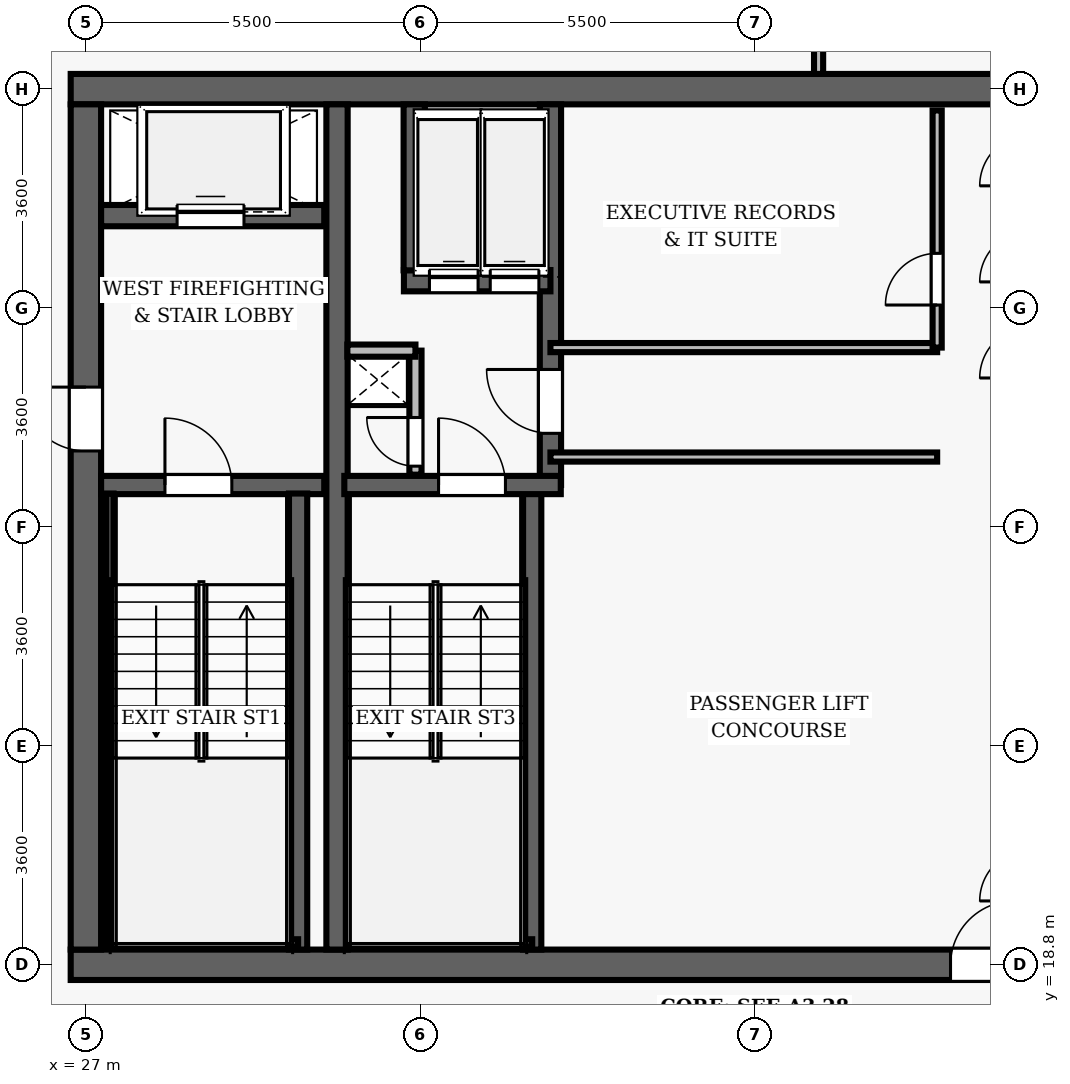
"""IFC4 building model, lengths in metres.
Left out: names, types, materials, properties, quantities, classifications, styles, units other than length and angle.
Written with IfcOpenShell. Run it as: python <this file> out.ifc"""

import sys

from ifc_helpers import new_model, si_unit, direction, frame, frame_2d, origin, place, context, subcontext, project, spatial, rectangle, extrude, element, fill, save


model = new_model("IFC4")
c1 = context("Model", 3, precision=1e-05, world=origin(), true_north=direction((0.0, 1.0)))
c2 = subcontext(c1, "Body", "Model", "MODEL_VIEW")
j1 = project(units=[si_unit("LENGTHUNIT", "METRE"), si_unit("PLANEANGLEUNIT", "RADIAN")], contexts=[c1])
p1 = place(None, origin())
s1 = spatial("IfcSite", under=j1, at=p1, CompositionType="ELEMENT")
p2 = place(p1, origin())
s2 = spatial("IfcBuilding", under=s1, at=p2, CompositionType="ELEMENT")
p3 = place(p2, frame((0.0, 0.0, 257.45)))
s3 = spatial("IfcBuildingStorey", under=s2, at=p3, CompositionType="ELEMENT", Elevation=257.45)
p4 = place(p3, frame((26.75, 18.8, 0.0), z_axis=(0.0, 0.0, 1.0), x_axis=(1.0, 0.0, 0.0)))
e1 = element("IfcWall", 1, at=p4, inside=s3, PredefinedType="SHEAR", context=c2, shape_type="SweptSolid", body=[
    extrude(rectangle(XDim=22.5, YDim=0.5, at=frame_2d((11.25, 0.0))), origin(), (0.0, 0.0, 1.0), 3.85),
])
p5 = place(p4, frame((14.47, 0.0, 0.0)))
e2 = element("IfcOpeningElement", 2, at=p5, cuts=e1, PredefinedType="OPENING", context=c2, shape_type="SweptSolid", body=[
    extrude(rectangle(XDim=1.05, YDim=2.15, at=frame_2d((0.525, 1.075))), frame((0.0, 0.26, 0.0), z_axis=(0.0, -1.0, 0.0), x_axis=(1.0, 0.0, 0.0)), (0.0, 0.0, 1.0), 0.52),
])
p6 = place(p3, frame((26.75, 33.2, 0.0), z_axis=(0.0, 0.0, 1.0), x_axis=(1.0, 0.0, 0.0)))
e3 = element("IfcWall", 3, at=p6, inside=s3, PredefinedType="SHEAR", context=c2, shape_type="SweptSolid", body=[
    extrude(rectangle(XDim=22.5, YDim=0.5, at=frame_2d((11.25, 0.0))), origin(), (0.0, 0.0, 1.0), 3.85),
])
p7 = place(p3, frame((27.0, 19.05, 0.0), z_axis=(0.0, 0.0, 1.0), x_axis=(0.0, 1.0, 0.0)))
e4 = element("IfcWall", 4, at=p7, inside=s3, PredefinedType="SHEAR", context=c2, shape_type="SweptSolid", body=[
    extrude(rectangle(XDim=13.9, YDim=0.5, at=frame_2d((6.95, 0.0))), origin(), (0.0, 0.0, 1.0), 3.85),
])
p8 = place(p7, frame((8.2, 0.0, 0.0)))
e5 = element("IfcOpeningElement", 5, at=p8, cuts=e4, PredefinedType="OPENING", context=c2, shape_type="SweptSolid", body=[
    extrude(rectangle(XDim=1.05, YDim=2.15, at=frame_2d((0.525, 1.075))), frame((0.0, 0.26, 0.0), z_axis=(0.0, -1.0, 0.0), x_axis=(1.0, 0.0, 0.0)), (0.0, 0.0, 1.0), 0.52),
])
p9 = place(p3, frame((31.13, 19.05, 0.0), z_axis=(0.0, 0.0, 1.0), x_axis=(0.0, 1.0, 0.0)))
e6 = element("IfcWall", 6, at=p9, inside=s3, PredefinedType="SHEAR", context=c2, shape_type="SweptSolid", body=[
    extrude(rectangle(XDim=13.9, YDim=0.35, at=frame_2d((6.95, 0.0))), origin(), (0.0, 0.0, 1.0), 3.85),
])
p10 = place(p3, frame((27.25, 26.69, 0.0), z_axis=(0.0, 0.0, 1.0), x_axis=(1.0, 0.0, 0.0)))
e7 = element("IfcWall", 7, at=p10, inside=s3, PredefinedType="SHEAR", context=c2, shape_type="SweptSolid", body=[
    extrude(rectangle(XDim=3.67, YDim=0.3, at=frame_2d((1.835, 0.0))), origin(), (0.0, 0.0, 1.0), 3.85),
])
p11 = place(p10, frame((1.05, 0.0, 0.0)))
e8 = element("IfcOpeningElement", 8, at=p11, cuts=e7, PredefinedType="OPENING", context=c2, shape_type="SweptSolid", body=[
    extrude(rectangle(XDim=1.1, YDim=2.15, at=frame_2d((0.55, 1.075))), frame((0.0, 0.16, 0.0), z_axis=(0.0, -1.0, 0.0), x_axis=(1.0, 0.0, 0.0)), (0.0, 0.0, 1.0), 0.32),
])
p12 = place(p3, frame((30.49, 19.05, 0.0), z_axis=(0.0, 0.0, 1.0), x_axis=(0.0, 1.0, 0.0)))
e9 = element("IfcWall", 9, at=p12, inside=s3, PredefinedType="SHEAR", context=c2, shape_type="SweptSolid", body=[
    extrude(rectangle(XDim=7.5, YDim=0.3, at=frame_2d((3.75, 0.0))), origin(), (0.0, 0.0, 1.0), 3.85),
])
p13 = place(p3, frame((27.395, 19.1, 0.0), z_axis=(0.0, 0.0, 1.0), x_axis=(0.0, 1.0, 0.0)))
e10 = element("IfcWall", 10, at=p13, inside=s3, PredefinedType="SHEAR", context=c2, shape_type="SweptSolid", body=[
    extrude(rectangle(XDim=7.45, YDim=0.12, at=frame_2d((3.725, 0.0))), origin(), (0.0, 0.0, 1.0), 3.85),
])
p14 = place(p3, frame((27.395, 19.16, 0.0), z_axis=(0.0, 0.0, 1.0), x_axis=(1.0, 0.0, 0.0)))
e11 = element("IfcWall", 11, at=p14, inside=s3, PredefinedType="SHEAR", context=c2, shape_type="SweptSolid", body=[
    extrude(rectangle(XDim=3.095, YDim=0.12, at=frame_2d((1.547, 0.0))), origin(), (0.0, 0.0, 1.0), 3.85),
])
p15 = place(p3, frame((27.25, 31.12, 0.0), z_axis=(0.0, 0.0, 1.0), x_axis=(1.0, 0.0, 0.0)))
e12 = element("IfcWall", 12, at=p15, inside=s3, PredefinedType="SHEAR", context=c2, shape_type="SweptSolid", body=[
    extrude(rectangle(XDim=3.67, YDim=0.35, at=frame_2d((1.835, 0.0))), origin(), (0.0, 0.0, 1.0), 3.04),
])
p16 = place(p15, frame((1.25, 0.0, 0.0)))
e13 = element("IfcOpeningElement", 13, at=p16, cuts=e12, PredefinedType="OPENING", context=c2, shape_type="SweptSolid", body=[
    extrude(rectangle(XDim=1.1, YDim=2.15, at=frame_2d((0.55, 1.075))), frame((0.0, 0.185, 0.0), z_axis=(0.0, -1.0, 0.0), x_axis=(1.0, 0.0, 0.0)), (0.0, 0.0, 1.0), 0.37),
])
p17 = place(p3, frame((34.34, 19.05, 0.0), z_axis=(0.0, 0.0, 1.0), x_axis=(0.0, 1.0, 0.0)))
e14 = element("IfcWall", 14, at=p17, inside=s3, PredefinedType="SHEAR", context=c2, shape_type="SweptSolid", body=[
    extrude(rectangle(XDim=7.5, YDim=0.3, at=frame_2d((3.75, 0.0))), origin(), (0.0, 0.0, 1.0), 3.85),
])
p18 = place(p3, frame((34.64, 26.69, 0.0), z_axis=(0.0, 0.0, 1.0), x_axis=(0.0, 1.0, 0.0)))
e15 = element("IfcWall", 15, at=p18, inside=s3, PredefinedType="SHEAR", context=c2, shape_type="SweptSolid", body=[
    extrude(rectangle(XDim=6.26, YDim=0.35, at=frame_2d((3.13, 0.0))), origin(), (0.0, 0.0, 1.0), 3.85),
])
p19 = place(p18, frame((0.85, 0.0, 0.0)))
e16 = element("IfcOpeningElement", 16, at=p19, cuts=e15, PredefinedType="OPENING", context=c2, shape_type="SweptSolid", body=[
    extrude(rectangle(XDim=1.05, YDim=2.15, at=frame_2d((0.525, 1.075))), frame((0.0, 0.185, 0.0), z_axis=(0.0, -1.0, 0.0), x_axis=(1.0, 0.0, 0.0)), (0.0, 0.0, 1.0), 0.37),
])
p20 = place(p3, frame((31.25, 26.69, 0.0), z_axis=(0.0, 0.0, 1.0), x_axis=(1.0, 0.0, 0.0)))
e17 = element("IfcWall", 17, at=p20, inside=s3, PredefinedType="SHEAR", context=c2, shape_type="SweptSolid", body=[
    extrude(rectangle(XDim=3.56, YDim=0.3, at=frame_2d((1.78, 0.0))), origin(), (0.0, 0.0, 1.0), 3.85),
])
p21 = place(p20, frame((1.55, 0.0, 0.0)))
e18 = element("IfcOpeningElement", 18, at=p21, cuts=e17, PredefinedType="OPENING", context=c2, shape_type="SweptSolid", body=[
    extrude(rectangle(XDim=1.1, YDim=2.15, at=frame_2d((0.55, 1.075))), frame((0.0, 0.16, 0.0), z_axis=(0.0, -1.0, 0.0), x_axis=(1.0, 0.0, 0.0)), (0.0, 0.0, 1.0), 0.32),
])
p22 = place(p3, frame((31.3, 19.16, 0.0), z_axis=(0.0, 0.0, 1.0), x_axis=(1.0, 0.0, 0.0)))
e19 = element("IfcWall", 19, at=p22, inside=s3, PredefinedType="SHEAR", context=c2, shape_type="SweptSolid", body=[
    extrude(rectangle(XDim=3.04, YDim=0.12, at=frame_2d((1.52, 0.0))), origin(), (0.0, 0.0, 1.0), 3.85),
])
p23 = place(p3, frame((32.23, 30.05, 0.0), z_axis=(0.0, 0.0, 1.0), x_axis=(1.0, 0.0, 0.0)))
e20 = element("IfcWall", 20, at=p23, inside=s3, PredefinedType="SHEAR", context=c2, shape_type="SweptSolid", body=[
    extrude(rectangle(XDim=2.41, YDim=0.35, at=frame_2d((1.205, 0.0))), origin(), (0.0, 0.0, 1.0), 3.04),
])
p24 = place(p23, frame((0.42, 0.0, 0.0)))
e21 = element("IfcOpeningElement", 21, at=p24, cuts=e20, PredefinedType="OPENING", context=c2, shape_type="SweptSolid", body=[
    extrude(rectangle(XDim=0.8, YDim=2.15, at=frame_2d((0.4, 1.075))), frame((0.0, 0.185, 0.0), z_axis=(0.0, -1.0, 0.0), x_axis=(1.0, 0.0, 0.0)), (0.0, 0.0, 1.0), 0.37),
])
p25 = place(p23, frame((1.42, 0.0, 0.0)))
e22 = element("IfcOpeningElement", 22, at=p25, cuts=e20, PredefinedType="OPENING", context=c2, shape_type="SweptSolid", body=[
    extrude(rectangle(XDim=0.8, YDim=2.15, at=frame_2d((0.4, 1.075))), frame((0.0, 0.185, 0.0), z_axis=(0.0, -1.0, 0.0), x_axis=(1.0, 0.0, 0.0)), (0.0, 0.0, 1.0), 0.37),
])
p26 = place(p3, frame((32.4, 30.22, 0.0), z_axis=(0.0, 0.0, 1.0), x_axis=(0.0, 1.0, 0.0)))
e23 = element("IfcWall", 23, at=p26, inside=s3, PredefinedType="SHEAR", context=c2, shape_type="SweptSolid", body=[
    extrude(rectangle(XDim=2.73, YDim=0.35, at=frame_2d((1.365, 0.0))), origin(), (0.0, 0.0, 1.0), 3.04),
])
p27 = place(p3, frame((32.42, 26.86, 0.0), z_axis=(0.0, 0.0, 1.0), x_axis=(0.0, 1.0, 0.0)))
e24 = element("IfcWall", 24, at=p27, inside=s3, PredefinedType="PARTITIONING", context=c2, shape_type="SweptSolid", body=[
    extrude(rectangle(XDim=2.04, YDim=0.2, at=frame_2d((1.02, 0.0))), origin(), (0.0, 0.0, 1.0), 3.04),
])
p28 = place(p27, frame((0.14, 0.0, 0.0)))
e25 = element("IfcOpeningElement", 25, at=p28, cuts=e24, PredefinedType="OPENING", context=c2, shape_type="SweptSolid", body=[
    extrude(rectangle(XDim=0.8, YDim=2.05, at=frame_2d((0.4, 1.025))), frame((0.0, 0.11, 0.0), z_axis=(0.0, -1.0, 0.0), x_axis=(1.0, 0.0, 0.0)), (0.0, 0.0, 1.0), 0.22),
])
p29 = place(p3, frame((31.3, 28.9, 0.0), z_axis=(0.0, 0.0, 1.0), x_axis=(1.0, 0.0, 0.0)))
e26 = element("IfcWall", 26, at=p29, inside=s3, PredefinedType="PARTITIONING", context=c2, shape_type="SweptSolid", body=[
    extrude(rectangle(XDim=1.12, YDim=0.2, at=frame_2d((0.56, 0.0))), origin(), (0.0, 0.0, 1.0), 3.04),
])
for number, where, z_axis, x_axis in (
    (27, (34.64, 27.15, 0.0), (0.0, 0.0, 1.0), (1.0, 0.0, 0.0)),
    (28, (34.64, 28.95, 0.0), (0.0, 0.0, 1.0), (1.0, 0.0, 0.0)),
):
    element("IfcWall", number, at=place(p3, frame(where, z_axis=z_axis, x_axis=x_axis)), inside=s3, PredefinedType="PARTITIONING", context=c2, shape_type="SweptSolid", body=[
        extrude(rectangle(XDim=6.36, YDim=0.15, at=frame_2d((3.18, 0.0))), origin(), (0.0, 0.0, 1.0), 3.04),
    ])
p30 = place(p3, frame((41.0, 28.95, 0.0), z_axis=(0.0, 0.0, 1.0), x_axis=(0.0, 1.0, 0.0)))
e29 = element("IfcWall", 29, at=p30, inside=s3, PredefinedType="PARTITIONING", context=c2, shape_type="SweptSolid", body=[
    extrude(rectangle(XDim=3.9, YDim=0.15, at=frame_2d((1.95, 0.0))), origin(), (0.0, 0.0, 1.0), 3.04),
])
p31 = place(p30, frame((0.7, 0.0, 0.0)))
e30 = element("IfcOpeningElement", 30, at=p31, cuts=e29, PredefinedType="OPENING", context=c2, shape_type="SweptSolid", body=[
    extrude(rectangle(XDim=0.85, YDim=2.1, at=frame_2d((0.425, 1.05))), frame((0.0, 0.085, 0.0), z_axis=(0.0, -1.0, 0.0), x_axis=(1.0, 0.0, 0.0)), (0.0, 0.0, 1.0), 0.17),
])
p32 = place(p3, frame((39.05, 33.45, 0.0), z_axis=(0.0, 0.0, 1.0), x_axis=(0.0, 1.0, 0.0)))
e31 = element("IfcWall", 31, at=p32, inside=s3, PredefinedType="PARTITIONING", context=c2, shape_type="SweptSolid", body=[
    extrude(rectangle(XDim=6.95, YDim=0.15, at=frame_2d((3.475, 0.0))), origin(), (0.0, 0.0, 1.0), 3.04),
])
p33 = place(p32, frame((1.262, 0.0, 0.0)))
e32 = element("IfcOpeningElement", 32, at=p33, cuts=e31, PredefinedType="OPENING", context=c2, shape_type="SweptSolid", body=[
    extrude(rectangle(XDim=0.95, YDim=2.15, at=frame_2d((0.475, 1.075))), frame((0.0, 0.085, 0.0), z_axis=(0.0, -1.0, 0.0), x_axis=(1.0, 0.0, 0.0)), (0.0, 0.0, 1.0), 0.17),
])
p34 = place(p11, origin())
e33 = element("IfcDoor", 33, at=p34, inside=s3, OperationType="SINGLE_SWING_LEFT", PredefinedType="DOOR", context=c2, shape_type="SweptSolid", body=[
    extrude(rectangle(XDim=1.1, YDim=2.15, at=frame_2d((0.55, 1.075))), frame((0.0, 0.025, 0.0), z_axis=(0.0, -1.0, 0.0), x_axis=(1.0, 0.0, 0.0)), (0.0, 0.0, 1.0), 0.05),
])
fill(e8, e33)
p35 = place(p8, origin())
e34 = element("IfcDoor", 34, at=p35, inside=s3, OperationType="SINGLE_SWING_RIGHT", PredefinedType="DOOR", context=c2, shape_type="SweptSolid", body=[
    extrude(rectangle(XDim=1.05, YDim=2.15, at=frame_2d((0.525, 1.075))), frame((0.0, 0.025, 0.0), z_axis=(0.0, -1.0, 0.0), x_axis=(1.0, 0.0, 0.0)), (0.0, 0.0, 1.0), 0.05),
])
fill(e5, e34)
p36 = place(p21, origin())
e35 = element("IfcDoor", 35, at=p36, inside=s3, OperationType="SINGLE_SWING_LEFT", PredefinedType="DOOR", context=c2, shape_type="SweptSolid", body=[
    extrude(rectangle(XDim=1.1, YDim=2.15, at=frame_2d((0.55, 1.075))), frame((0.0, 0.025, 0.0), z_axis=(0.0, -1.0, 0.0), x_axis=(1.0, 0.0, 0.0)), (0.0, 0.0, 1.0), 0.05),
])
fill(e18, e35)
p37 = place(p28, origin())
e36 = element("IfcDoor", 36, at=p37, inside=s3, OperationType="SINGLE_SWING_RIGHT", PredefinedType="DOOR", context=c2, shape_type="SweptSolid", body=[
    extrude(rectangle(XDim=0.8, YDim=2.05, at=frame_2d((0.4, 1.025))), frame((0.0, 0.025, 0.0), z_axis=(0.0, -1.0, 0.0), x_axis=(1.0, 0.0, 0.0)), (0.0, 0.0, 1.0), 0.05),
])
fill(e25, e36)
p38 = place(p5, origin())
e37 = element("IfcDoor", 37, at=p38, inside=s3, OperationType="SINGLE_SWING_RIGHT", PredefinedType="DOOR", context=c2, shape_type="SweptSolid", body=[
    extrude(rectangle(XDim=1.05, YDim=2.15, at=frame_2d((0.525, 1.075))), frame((0.0, 0.025, 0.0), z_axis=(0.0, -1.0, 0.0), x_axis=(1.0, 0.0, 0.0)), (0.0, 0.0, 1.0), 0.05),
])
fill(e2, e37)
p39 = place(p19, origin())
e38 = element("IfcDoor", 38, at=p39, inside=s3, OperationType="SINGLE_SWING_RIGHT", PredefinedType="DOOR", context=c2, shape_type="SweptSolid", body=[
    extrude(rectangle(XDim=1.05, YDim=2.15, at=frame_2d((0.525, 1.075))), frame((0.0, 0.025, 0.0), z_axis=(0.0, -1.0, 0.0), x_axis=(1.0, 0.0, 0.0)), (0.0, 0.0, 1.0), 0.05),
])
fill(e16, e38)
p40 = place(p31, origin())
e39 = element("IfcDoor", 39, at=p40, inside=s3, OperationType="SINGLE_SWING_LEFT", PredefinedType="DOOR", context=c2, shape_type="SweptSolid", body=[
    extrude(rectangle(XDim=0.85, YDim=2.1, at=frame_2d((0.425, 1.05))), frame((0.0, 0.025, 0.0), z_axis=(0.0, -1.0, 0.0), x_axis=(1.0, 0.0, 0.0)), (0.0, 0.0, 1.0), 0.05),
])
fill(e30, e39)
p41 = place(p16, origin())
e40 = element("IfcDoor", 40, at=p41, inside=s3, OperationType="SLIDING_TO_LEFT", PredefinedType="DOOR", context=c2, shape_type="SweptSolid", body=[
    extrude(rectangle(XDim=1.1, YDim=2.15, at=frame_2d((0.55, 1.075))), frame((0.0, 0.025, 0.0), z_axis=(0.0, -1.0, 0.0), x_axis=(1.0, 0.0, 0.0)), (0.0, 0.0, 1.0), 0.05),
])
fill(e13, e40)
p42 = place(p24, origin())
e41 = element("IfcDoor", 41, at=p42, inside=s3, OperationType="SLIDING_TO_LEFT", PredefinedType="DOOR", context=c2, shape_type="SweptSolid", body=[
    extrude(rectangle(XDim=0.8, YDim=2.15, at=frame_2d((0.4, 1.075))), frame((0.0, 0.025, 0.0), z_axis=(0.0, -1.0, 0.0), x_axis=(1.0, 0.0, 0.0)), (0.0, 0.0, 1.0), 0.05),
])
fill(e21, e41)
p43 = place(p25, origin())
e42 = element("IfcDoor", 42, at=p43, inside=s3, OperationType="SLIDING_TO_LEFT", PredefinedType="DOOR", context=c2, shape_type="SweptSolid", body=[
    extrude(rectangle(XDim=0.8, YDim=2.15, at=frame_2d((0.4, 1.075))), frame((0.0, 0.025, 0.0), z_axis=(0.0, -1.0, 0.0), x_axis=(1.0, 0.0, 0.0)), (0.0, 0.0, 1.0), 0.05),
])
fill(e22, e42)
save(model, sys.argv[1])
